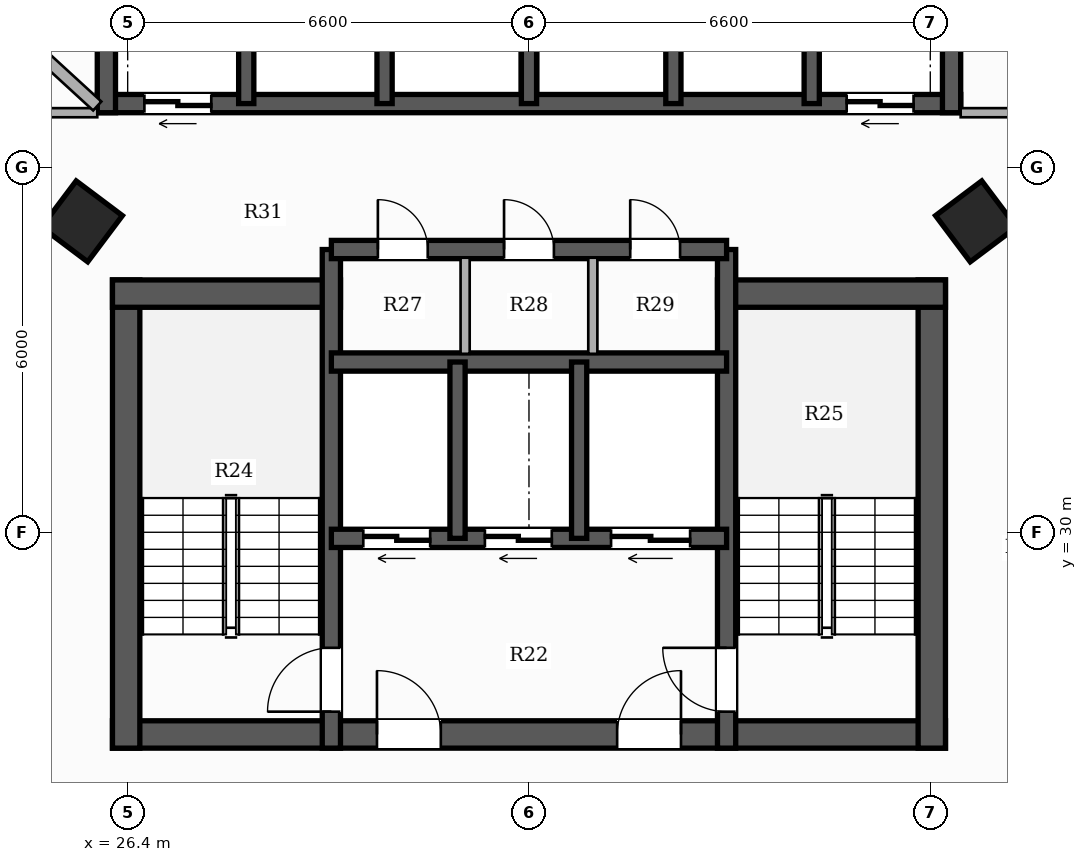
"""IFC4 building model, lengths in metres.
Left out: names, types, materials, properties, quantities, classifications, styles, units other than length and angle.
Written with IfcOpenShell. Run it as: python <this file> out.ifc"""

import sys

from ifc_helpers import new_model, si_unit, direction, frame, frame_2d, origin, origin_2d, place, context, subcontext, project, spatial, rectangle, hollow_rectangle, extrude, element, fill, save


model = new_model("IFC4")
c1 = context("Model", 3, precision=1e-05, world=origin(), true_north=direction((0.0, 1.0)))
c2 = subcontext(c1, "Body", "Model", "MODEL_VIEW")
j1 = project(units=[si_unit("LENGTHUNIT", "METRE"), si_unit("PLANEANGLEUNIT", "RADIAN")], contexts=[c1])
p1 = place(None, origin())
s1 = spatial("IfcSite", under=j1, at=p1, CompositionType="ELEMENT")
p2 = place(p1, origin())
s2 = spatial("IfcBuilding", under=s1, at=p2, CompositionType="ELEMENT")
p3 = place(p2, frame((0.0, 0.0, 40.1)))
s3 = spatial("IfcBuildingStorey", under=s2, at=p3, CompositionType="ELEMENT", Elevation=40.1)
p4 = place(p3, frame((26.15, 26.675, 0.0), z_axis=(0.0, 0.0, 1.0), x_axis=(1.0, 0.0, 0.0)))
e1 = element("IfcWall", 1, at=p4, inside=s3, PredefinedType="SHEAR", context=c2, shape_type="SweptSolid", body=[
    extrude(rectangle(XDim=13.7, YDim=0.45, at=frame_2d((6.85, 0.0))), origin(), (0.0, 0.0, 1.0), 3.3),
])
p5 = place(p4, frame((4.35, 0.0, 0.0)))
e2 = element("IfcOpeningElement", 2, at=p5, cuts=e1, PredefinedType="OPENING", context=c2, shape_type="SweptSolid", body=[
    extrude(rectangle(XDim=1.05, YDim=2.15, at=frame_2d((0.525, 1.075))), frame((0.0, 0.235, 0.0), z_axis=(0.0, -1.0, 0.0), x_axis=(1.0, 0.0, 0.0)), (0.0, 0.0, 1.0), 0.47),
])
p6 = place(p4, frame((8.3, 0.0, 0.0)))
e3 = element("IfcOpeningElement", 3, at=p6, cuts=e1, PredefinedType="OPENING", context=c2, shape_type="SweptSolid", body=[
    extrude(rectangle(XDim=1.05, YDim=2.15, at=frame_2d((0.525, 1.075))), frame((0.0, 0.235, 0.0), z_axis=(0.0, -1.0, 0.0), x_axis=(1.0, 0.0, 0.0)), (0.0, 0.0, 1.0), 0.47),
])
p7 = place(p3, frame((26.375, 26.45, 0.0), z_axis=(0.0, 0.0, 1.0), x_axis=(0.0, 1.0, 0.0)))
e4 = element("IfcWall", 4, at=p7, inside=s3, PredefinedType="SHEAR", context=c2, shape_type="SweptSolid", body=[
    extrude(rectangle(XDim=7.7, YDim=0.45, at=frame_2d((3.85, 0.0))), origin(), (0.0, 0.0, 1.0), 3.3),
])
p8 = place(p3, frame((26.15, 33.925, 0.0), z_axis=(0.0, 0.0, 1.0), x_axis=(1.0, 0.0, 0.0)))
e5 = element("IfcWall", 5, at=p8, inside=s3, PredefinedType="SHEAR", context=c2, shape_type="SweptSolid", body=[
    extrude(rectangle(XDim=3.75, YDim=0.45, at=frame_2d((1.875, 0.0))), origin(), (0.0, 0.0, 1.0), 3.3),
])
p9 = place(p3, frame((39.625, 26.45, 0.0), z_axis=(0.0, 0.0, 1.0), x_axis=(0.0, 1.0, 0.0)))
e6 = element("IfcWall", 6, at=p9, inside=s3, PredefinedType="SHEAR", context=c2, shape_type="SweptSolid", body=[
    extrude(rectangle(XDim=7.7, YDim=0.45, at=frame_2d((3.85, 0.0))), origin(), (0.0, 0.0, 1.0), 3.3),
])
p10 = place(p3, frame((36.1, 33.925, 0.0), z_axis=(0.0, 0.0, 1.0), x_axis=(1.0, 0.0, 0.0)))
e7 = element("IfcWall", 7, at=p10, inside=s3, PredefinedType="SHEAR", context=c2, shape_type="SweptSolid", body=[
    extrude(rectangle(XDim=3.75, YDim=0.45, at=frame_2d((1.875, 0.0))), origin(), (0.0, 0.0, 1.0), 3.3),
])
p11 = place(p3, frame((29.75, 26.45, 0.0), z_axis=(0.0, 0.0, 1.0), x_axis=(0.0, 1.0, 0.0)))
e8 = element("IfcWall", 8, at=p11, inside=s3, PredefinedType="SHEAR", context=c2, shape_type="SweptSolid", body=[
    extrude(rectangle(XDim=8.2, YDim=0.3, at=frame_2d((4.1, 0.0))), origin(), (0.0, 0.0, 1.0), 3.3),
])
p12 = place(p11, frame((0.6, 0.0, 0.0)))
e9 = element("IfcOpeningElement", 9, at=p12, cuts=e8, PredefinedType="OPENING", context=c2, shape_type="SweptSolid", body=[
    extrude(rectangle(XDim=1.05, YDim=2.15, at=frame_2d((0.525, 1.075))), frame((0.0, 0.16, 0.0), z_axis=(0.0, -1.0, 0.0), x_axis=(1.0, 0.0, 0.0)), (0.0, 0.0, 1.0), 0.32),
])
p13 = place(p3, frame((36.25, 26.45, 0.0), z_axis=(0.0, 0.0, 1.0), x_axis=(0.0, 1.0, 0.0)))
e10 = element("IfcWall", 10, at=p13, inside=s3, PredefinedType="SHEAR", context=c2, shape_type="SweptSolid", body=[
    extrude(rectangle(XDim=8.2, YDim=0.3, at=frame_2d((4.1, 0.0))), origin(), (0.0, 0.0, 1.0), 3.3),
])
p14 = place(p13, frame((0.6, 0.0, 0.0)))
e11 = element("IfcOpeningElement", 11, at=p14, cuts=e10, PredefinedType="OPENING", context=c2, shape_type="SweptSolid", body=[
    extrude(rectangle(XDim=1.05, YDim=2.15, at=frame_2d((0.525, 1.075))), frame((0.0, 0.16, 0.0), z_axis=(0.0, -1.0, 0.0), x_axis=(1.0, 0.0, 0.0)), (0.0, 0.0, 1.0), 0.32),
])
p15 = place(p3, frame((36.25, 29.9, 0.0), z_axis=(0.0, 0.0, 1.0), x_axis=(-1.0, 0.0, 0.0)))
e12 = element("IfcWall", 12, at=p15, inside=s3, PredefinedType="SHEAR", context=c2, shape_type="SweptSolid", body=[
    extrude(rectangle(XDim=6.5, YDim=0.3, at=frame_2d((3.25, 0.0))), origin(), (0.0, 0.0, 1.0), 3.3),
])
p16 = place(p15, frame((4.875, 0.0, 0.0)))
e13 = element("IfcOpeningElement", 13, at=p16, cuts=e12, PredefinedType="OPENING", context=c2, shape_type="SweptSolid", body=[
    extrude(rectangle(XDim=1.1, YDim=2.2, at=frame_2d((0.55, 1.1))), frame((0.0, 0.16, 0.0), z_axis=(0.0, -1.0, 0.0), x_axis=(1.0, 0.0, 0.0)), (0.0, 0.0, 1.0), 0.32),
])
p17 = place(p15, frame((2.875, 0.0, 0.0)))
e14 = element("IfcOpeningElement", 14, at=p17, cuts=e12, PredefinedType="OPENING", context=c2, shape_type="SweptSolid", body=[
    extrude(rectangle(XDim=1.1, YDim=2.2, at=frame_2d((0.55, 1.1))), frame((0.0, 0.16, 0.0), z_axis=(0.0, -1.0, 0.0), x_axis=(1.0, 0.0, 0.0)), (0.0, 0.0, 1.0), 0.32),
])
p18 = place(p15, frame((0.6, 0.0, 0.0)))
e15 = element("IfcOpeningElement", 15, at=p18, cuts=e12, PredefinedType="OPENING", context=c2, shape_type="SweptSolid", body=[
    extrude(rectangle(XDim=1.3, YDim=2.2, at=frame_2d((0.65, 1.1))), frame((0.0, 0.16, 0.0), z_axis=(0.0, -1.0, 0.0), x_axis=(1.0, 0.0, 0.0)), (0.0, 0.0, 1.0), 0.32),
])
p19 = place(p3, frame((29.75, 32.8, 0.0), z_axis=(0.0, 0.0, 1.0), x_axis=(1.0, 0.0, 0.0)))
e16 = element("IfcWall", 16, at=p19, inside=s3, PredefinedType="SHEAR", context=c2, shape_type="SweptSolid", body=[
    extrude(rectangle(XDim=6.5, YDim=0.3, at=frame_2d((3.25, 0.0))), origin(), (0.0, 0.0, 1.0), 3.3),
])
for number, where, z_axis, x_axis in (
    (17, (31.825, 29.9, 0.0), (0.0, 0.0, 1.0), (0.0, 1.0, 0.0)),
    (18, (33.825, 29.9, 0.0), (0.0, 0.0, 1.0), (0.0, 1.0, 0.0)),
):
    element("IfcWall", number, at=place(p3, frame(where, z_axis=z_axis, x_axis=x_axis)), inside=s3, PredefinedType="SHEAR", context=c2, shape_type="SweptSolid", body=[
        extrude(rectangle(XDim=2.9, YDim=0.25, at=frame_2d((1.45, 0.0))), origin(), (0.0, 0.0, 1.0), 3.3),
    ])
p20 = place(p3, frame((29.75, 34.65, 0.0), z_axis=(0.0, 0.0, 1.0), x_axis=(1.0, 0.0, 0.0)))
e19 = element("IfcWall", 19, at=p20, inside=s3, PredefinedType="SHEAR", context=c2, shape_type="SweptSolid", body=[
    extrude(rectangle(XDim=6.5, YDim=0.3, at=frame_2d((3.25, 0.0))), origin(), (0.0, 0.0, 1.0), 3.3),
])
p21 = place(p20, frame((0.765, 0.0, 0.0)))
e20 = element("IfcOpeningElement", 20, at=p21, cuts=e19, PredefinedType="OPENING", context=c2, shape_type="SweptSolid", body=[
    extrude(rectangle(XDim=0.82, YDim=2.1, at=frame_2d((0.41, 1.05))), frame((0.0, 0.16, 0.0), z_axis=(0.0, -1.0, 0.0), x_axis=(1.0, 0.0, 0.0)), (0.0, 0.0, 1.0), 0.32),
])
p22 = place(p20, frame((2.84, 0.0, 0.0)))
e21 = element("IfcOpeningElement", 21, at=p22, cuts=e19, PredefinedType="OPENING", context=c2, shape_type="SweptSolid", body=[
    extrude(rectangle(XDim=0.82, YDim=2.1, at=frame_2d((0.41, 1.05))), frame((0.0, 0.16, 0.0), z_axis=(0.0, -1.0, 0.0), x_axis=(1.0, 0.0, 0.0)), (0.0, 0.0, 1.0), 0.32),
])
p23 = place(p20, frame((4.915, 0.0, 0.0)))
e22 = element("IfcOpeningElement", 22, at=p23, cuts=e19, PredefinedType="OPENING", context=c2, shape_type="SweptSolid", body=[
    extrude(rectangle(XDim=0.82, YDim=2.1, at=frame_2d((0.41, 1.05))), frame((0.0, 0.16, 0.0), z_axis=(0.0, -1.0, 0.0), x_axis=(1.0, 0.0, 0.0)), (0.0, 0.0, 1.0), 0.32),
])
p24 = place(p3, frame((40.1, 37.05, 0.0), z_axis=(0.0, 0.0, 1.0), x_axis=(-1.0, 0.0, 0.0)))
e23 = element("IfcWall", 23, at=p24, inside=s3, PredefinedType="SHEAR", context=c2, shape_type="SweptSolid", body=[
    extrude(rectangle(XDim=14.2, YDim=0.3, at=frame_2d((7.1, 0.0))), origin(), (0.0, 0.0, 1.0), 3.3),
])
p25 = place(p24, frame((12.325, 0.0, 0.0)))
e24 = element("IfcOpeningElement", 24, at=p25, cuts=e23, PredefinedType="OPENING", context=c2, shape_type="SweptSolid", body=[
    extrude(rectangle(XDim=1.1, YDim=2.2, at=frame_2d((0.55, 1.1))), frame((0.0, 0.16, 0.0), z_axis=(0.0, -1.0, 0.0), x_axis=(1.0, 0.0, 0.0)), (0.0, 0.0, 1.0), 0.32),
])
p26 = place(p24, frame((0.775, 0.0, 0.0)))
e25 = element("IfcOpeningElement", 25, at=p26, cuts=e23, PredefinedType="OPENING", context=c2, shape_type="SweptSolid", body=[
    extrude(rectangle(XDim=1.1, YDim=2.2, at=frame_2d((0.55, 1.1))), frame((0.0, 0.16, 0.0), z_axis=(0.0, -1.0, 0.0), x_axis=(1.0, 0.0, 0.0)), (0.0, 0.0, 1.0), 0.32),
])
for number, where, z_axis, x_axis in (
    (26, (26.05, 36.9, 0.0), (0.0, 0.0, 1.0), (0.0, 1.0, 0.0)),
    (27, (39.95, 36.9, 0.0), (0.0, 0.0, 1.0), (0.0, 1.0, 0.0)),
):
    element("IfcWall", number, at=place(p3, frame(where, z_axis=z_axis, x_axis=x_axis)), inside=s3, PredefinedType="SHEAR", context=c2, shape_type="SweptSolid", body=[
        extrude(rectangle(XDim=2.85, YDim=0.3, at=frame_2d((1.425, 0.0))), origin(), (0.0, 0.0, 1.0), 3.3),
    ])
for number, where, z_axis, x_axis in (
    (28, (28.35, 37.05, 0.0), (0.0, 0.0, 1.0), (0.0, 1.0, 0.0)),
    (29, (30.625, 37.05, 0.0), (0.0, 0.0, 1.0), (0.0, 1.0, 0.0)),
    (30, (33.0, 37.05, 0.0), (0.0, 0.0, 1.0), (0.0, 1.0, 0.0)),
    (31, (35.375, 37.05, 0.0), (0.0, 0.0, 1.0), (0.0, 1.0, 0.0)),
    (32, (37.65, 37.05, 0.0), (0.0, 0.0, 1.0), (0.0, 1.0, 0.0)),
):
    element("IfcWall", number, at=place(p3, frame(where, z_axis=z_axis, x_axis=x_axis)), inside=s3, PredefinedType="SHEAR", context=c2, shape_type="SweptSolid", body=[
        extrude(rectangle(XDim=2.55, YDim=0.25, at=frame_2d((1.275, 0.0))), origin(), (0.0, 0.0, 1.0), 3.3),
    ])
for number, where, z_axis, x_axis in (
    (33, (25.648, 35.113, 0.0), (0.0, 0.0, 1.0), (0.6, 0.8, 0.0)),
    (34, (40.352, 35.113, 0.0), (0.0, 0.0, 1.0), (-0.6, 0.8, 0.0)),
):
    element("IfcColumn", number, at=place(p3, frame(where, z_axis=z_axis, x_axis=x_axis)), inside=s3, PredefinedType="COLUMN", context=c2, shape_type="SweptSolid", body=[
        extrude(hollow_rectangle(XDim=0.95, YDim=0.95, WallThickness=0.032, at=origin_2d()), origin(), (0.0, 0.0, 1.0), 3.3),
    ])
for number, where, z_axis, x_axis in (
    (35, (31.95, 32.935, 0.0), (0.0, 0.0, 1.0), (0.0, 1.0, 0.0)),
    (36, (34.05, 32.935, 0.0), (0.0, 0.0, 1.0), (0.0, 1.0, 0.0)),
):
    element("IfcWall", number, at=place(p3, frame(where, z_axis=z_axis, x_axis=x_axis)), inside=s3, PredefinedType="PARTITIONING", context=c2, shape_type="SweptSolid", body=[
        extrude(rectangle(XDim=1.58, YDim=0.15, at=frame_2d((0.79, 0.0))), origin(), (0.0, 0.0, 1.0), 3.06),
    ])
p27 = place(p3, frame((40.1, 36.9, 0.0), z_axis=(0.0, 0.0, 1.0), x_axis=(1.0, 0.0, 0.0)))
e37 = element("IfcWall", 37, at=p27, inside=s3, PredefinedType="PARTITIONING", context=c2, shape_type="SweptSolid", body=[
    extrude(rectangle(XDim=2.55, YDim=0.15, at=frame_2d((1.275, 0.0))), origin(), (0.0, 0.0, 1.0), 2.413),
])
p28 = place(p3, frame((23.41, 36.9, 0.0), z_axis=(0.0, 0.0, 1.0), x_axis=(1.0, 0.0, 0.0)))
e38 = element("IfcWall", 38, at=p28, inside=s3, PredefinedType="PARTITIONING", context=c2, shape_type="SweptSolid", body=[
    extrude(rectangle(XDim=2.49, YDim=0.15, at=frame_2d((1.245, 0.0))), origin(), (0.0, 0.0, 1.0), 2.413),
])
p29 = place(p3, frame((25.9, 37.01, 0.0), z_axis=(0.0, 0.0, 1.0), x_axis=(-0.737010798249, 0.675880968266, 0.0)))
e39 = element("IfcWall", 39, at=p29, inside=s3, PredefinedType="PARTITIONING", context=c2, shape_type="SweptSolid", body=[
    extrude(rectangle(XDim=5.02, YDim=0.2, at=frame_2d((2.51, 0.0))), origin(), (0.0, 0.0, 1.0), 3.06),
])
p30 = place(p12, origin())
e40 = element("IfcDoor", 40, at=p30, inside=s3, OperationType="SINGLE_SWING_LEFT", PredefinedType="DOOR", context=c2, shape_type="SweptSolid", body=[
    extrude(rectangle(XDim=1.05, YDim=2.15, at=frame_2d((0.525, 1.075))), frame((0.0, 0.025, 0.0), z_axis=(0.0, -1.0, 0.0), x_axis=(1.0, 0.0, 0.0)), (0.0, 0.0, 1.0), 0.05),
])
fill(e9, e40)
p31 = place(p14, origin())
e41 = element("IfcDoor", 41, at=p31, inside=s3, OperationType="SINGLE_SWING_RIGHT", PredefinedType="DOOR", context=c2, shape_type="SweptSolid", body=[
    extrude(rectangle(XDim=1.05, YDim=2.15, at=frame_2d((0.525, 1.075))), frame((0.0, 0.025, 0.0), z_axis=(0.0, -1.0, 0.0), x_axis=(1.0, 0.0, 0.0)), (0.0, 0.0, 1.0), 0.05),
])
fill(e11, e41)
p32 = place(p5, origin())
e42 = element("IfcDoor", 42, at=p32, inside=s3, OperationType="SINGLE_SWING_LEFT", PredefinedType="DOOR", context=c2, shape_type="SweptSolid", body=[
    extrude(rectangle(XDim=1.05, YDim=2.15, at=frame_2d((0.525, 1.075))), frame((0.0, 0.025, 0.0), z_axis=(0.0, -1.0, 0.0), x_axis=(1.0, 0.0, 0.0)), (0.0, 0.0, 1.0), 0.05),
])
fill(e2, e42)
p33 = place(p6, origin())
e43 = element("IfcDoor", 43, at=p33, inside=s3, OperationType="SINGLE_SWING_RIGHT", PredefinedType="DOOR", context=c2, shape_type="SweptSolid", body=[
    extrude(rectangle(XDim=1.05, YDim=2.15, at=frame_2d((0.525, 1.075))), frame((0.0, 0.025, 0.0), z_axis=(0.0, -1.0, 0.0), x_axis=(1.0, 0.0, 0.0)), (0.0, 0.0, 1.0), 0.05),
])
fill(e3, e43)
p34 = place(p16, origin())
e44 = element("IfcDoor", 44, at=p34, inside=s3, OperationType="DOUBLE_DOOR_SLIDING", PredefinedType="DOOR", context=c2, shape_type="SweptSolid", body=[
    extrude(rectangle(XDim=1.1, YDim=2.2, at=frame_2d((0.55, 1.1))), frame((0.0, 0.025, 0.0), z_axis=(0.0, -1.0, 0.0), x_axis=(1.0, 0.0, 0.0)), (0.0, 0.0, 1.0), 0.05),
])
fill(e13, e44)
p35 = place(p17, origin())
e45 = element("IfcDoor", 45, at=p35, inside=s3, OperationType="DOUBLE_DOOR_SLIDING", PredefinedType="DOOR", context=c2, shape_type="SweptSolid", body=[
    extrude(rectangle(XDim=1.1, YDim=2.2, at=frame_2d((0.55, 1.1))), frame((0.0, 0.025, 0.0), z_axis=(0.0, -1.0, 0.0), x_axis=(1.0, 0.0, 0.0)), (0.0, 0.0, 1.0), 0.05),
])
fill(e14, e45)
p36 = place(p18, origin())
e46 = element("IfcDoor", 46, at=p36, inside=s3, OperationType="DOUBLE_DOOR_SLIDING", PredefinedType="DOOR", context=c2, shape_type="SweptSolid", body=[
    extrude(rectangle(XDim=1.3, YDim=2.2, at=frame_2d((0.65, 1.1))), frame((0.0, 0.025, 0.0), z_axis=(0.0, -1.0, 0.0), x_axis=(1.0, 0.0, 0.0)), (0.0, 0.0, 1.0), 0.05),
])
fill(e15, e46)
p37 = place(p25, origin())
e47 = element("IfcDoor", 47, at=p37, inside=s3, OperationType="DOUBLE_DOOR_SLIDING", PredefinedType="DOOR", context=c2, shape_type="SweptSolid", body=[
    extrude(rectangle(XDim=1.1, YDim=2.2, at=frame_2d((0.55, 1.1))), frame((0.0, 0.025, 0.0), z_axis=(0.0, -1.0, 0.0), x_axis=(1.0, 0.0, 0.0)), (0.0, 0.0, 1.0), 0.05),
])
fill(e24, e47)
p38 = place(p26, origin())
e48 = element("IfcDoor", 48, at=p38, inside=s3, OperationType="DOUBLE_DOOR_SLIDING", PredefinedType="DOOR", context=c2, shape_type="SweptSolid", body=[
    extrude(rectangle(XDim=1.1, YDim=2.2, at=frame_2d((0.55, 1.1))), frame((0.0, 0.025, 0.0), z_axis=(0.0, -1.0, 0.0), x_axis=(1.0, 0.0, 0.0)), (0.0, 0.0, 1.0), 0.05),
])
fill(e25, e48)
p39 = place(p21, origin())
e49 = element("IfcDoor", 49, at=p39, inside=s3, OperationType="SINGLE_SWING_LEFT", PredefinedType="DOOR", context=c2, shape_type="SweptSolid", body=[
    extrude(rectangle(XDim=0.82, YDim=2.1, at=frame_2d((0.41, 1.05))), frame((0.0, 0.025, 0.0), z_axis=(0.0, -1.0, 0.0), x_axis=(1.0, 0.0, 0.0)), (0.0, 0.0, 1.0), 0.05),
])
fill(e20, e49)
p40 = place(p22, origin())
e50 = element("IfcDoor", 50, at=p40, inside=s3, OperationType="SINGLE_SWING_LEFT", PredefinedType="DOOR", context=c2, shape_type="SweptSolid", body=[
    extrude(rectangle(XDim=0.82, YDim=2.1, at=frame_2d((0.41, 1.05))), frame((0.0, 0.025, 0.0), z_axis=(0.0, -1.0, 0.0), x_axis=(1.0, 0.0, 0.0)), (0.0, 0.0, 1.0), 0.05),
])
fill(e21, e50)
p41 = place(p23, origin())
e51 = element("IfcDoor", 51, at=p41, inside=s3, OperationType="SINGLE_SWING_LEFT", PredefinedType="DOOR", context=c2, shape_type="SweptSolid", body=[
    extrude(rectangle(XDim=0.82, YDim=2.1, at=frame_2d((0.41, 1.05))), frame((0.0, 0.025, 0.0), z_axis=(0.0, -1.0, 0.0), x_axis=(1.0, 0.0, 0.0)), (0.0, 0.0, 1.0), 0.05),
])
fill(e22, e51)
save(model, sys.argv[1])
